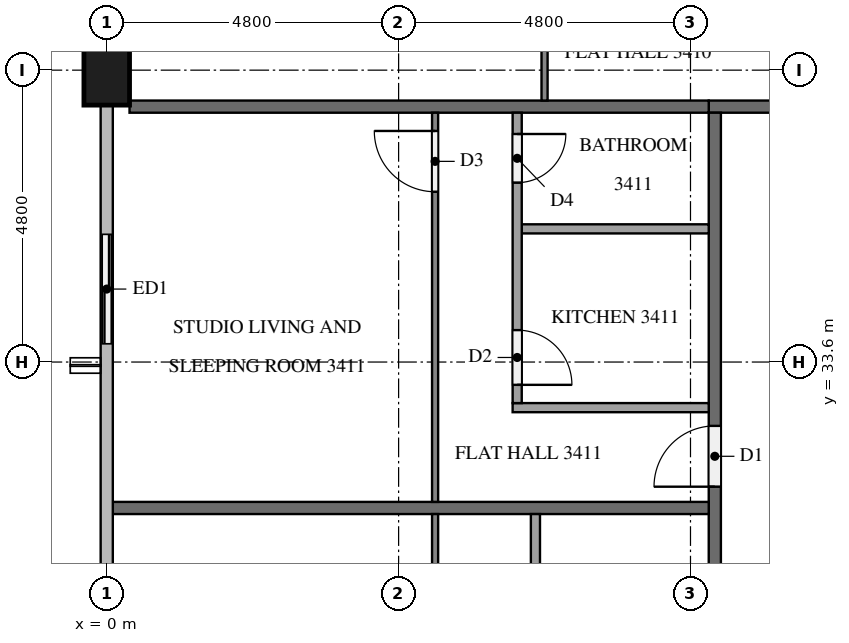
"""IFC4 building model, lengths in metres.
Left out: names, types, materials, properties, quantities, classifications, styles, units other than length and angle.
Written with IfcOpenShell. Run it as: python <this file> out.ifc"""

import sys

from ifc_helpers import new_model, si_unit, direction, frame, frame_2d, origin, origin_2d, place, context, subcontext, project, spatial, rectangle, extrude, element, fill, save


model = new_model("IFC4")
c1 = context("Model", 3, precision=1e-05, world=origin(), true_north=direction((0.0, 1.0)))
c2 = subcontext(c1, "Body", "Model", "MODEL_VIEW")
j1 = project(units=[si_unit("LENGTHUNIT", "METRE"), si_unit("PLANEANGLEUNIT", "RADIAN")], contexts=[c1])
p1 = place(None, origin())
s1 = spatial("IfcSite", under=j1, at=p1, CompositionType="ELEMENT")
p2 = place(p1, origin())
s2 = spatial("IfcBuilding", under=s1, at=p2, CompositionType="ELEMENT")
p3 = place(p2, frame((0.0, 0.0, 133.1)))
s3 = spatial("IfcBuildingStorey", under=s2, at=p3, CompositionType="ELEMENT", Elevation=133.1)
p4 = place(p3, frame((0.0, 38.4, 0.0), z_axis=(0.0, 0.0, 1.0), x_axis=(0.0, 1.0, 0.0)))
e1 = element("IfcColumn", 1, at=p4, inside=s3, PredefinedType="COLUMN", context=c2, shape_type="SweptSolid", body=[
    extrude(rectangle(XDim=1.15, YDim=0.75, at=origin_2d()), origin(), (0.0, 0.0, 1.0), 3.2),
])
p5 = place(p3, frame((0.0, 36.0, 0.0), z_axis=(0.0, 0.0, 1.0), x_axis=(0.0, -1.0, 0.0)))
e2 = element("IfcWall", 2, at=p5, inside=s3, PredefinedType="SOLIDWALL", context=c2, shape_type="SweptSolid", body=[
    extrude(rectangle(XDim=2.4, YDim=0.15, at=frame_2d((1.2, 0.0))), origin(), (0.0, 0.0, 1.0), 3.2),
])
p6 = place(p5, frame((0.3, 0.0, 0.0)))
e3 = element("IfcOpeningElement", 3, at=p6, cuts=e2, PredefinedType="OPENING", context=c2, shape_type="SweptSolid", body=[
    extrude(rectangle(XDim=1.8, YDim=2.4, at=frame_2d((0.9, 1.2))), frame((0.0, 0.085, 0.0), z_axis=(0.0, -1.0, 0.0), x_axis=(1.0, 0.0, 0.0)), (0.0, 0.0, 1.0), 0.17),
])
p7 = place(p3, frame((12.1, 37.8, 0.0), z_axis=(0.0, 0.0, 1.0), x_axis=(-1.0, 0.0, 0.0)))
e4 = element("IfcWall", 4, at=p7, inside=s3, PredefinedType="PARTITIONING", context=c2, shape_type="SweptSolid", body=[
    extrude(rectangle(XDim=2.2, YDim=0.2, at=frame_2d((1.1, 0.0))), origin(), (0.0, 0.0, 1.0), 3.2),
])
p8 = place(p3, frame((10.0, 15.1, 0.0), z_axis=(0.0, 0.0, 1.0), x_axis=(0.0, 1.0, 0.0)))
e5 = element("IfcWall", 5, at=p8, inside=s3, PredefinedType="PARTITIONING", context=c2, shape_type="SweptSolid", body=[
    extrude(rectangle(XDim=22.6, YDim=0.2, at=frame_2d((11.3, 0.0))), origin(), (0.0, 0.0, 1.0), 3.2),
])
p9 = place(p8, frame((16.45, 0.0, 0.0)))
e6 = element("IfcOpeningElement", 6, at=p9, cuts=e5, PredefinedType="OPENING", context=c2, shape_type="SweptSolid", body=[
    extrude(rectangle(XDim=1.0, YDim=2.1, at=frame_2d((0.5, 1.05))), frame((0.0, 0.11, 0.0), z_axis=(0.0, -1.0, 0.0), x_axis=(1.0, 0.0, 0.0)), (0.0, 0.0, 1.0), 0.22),
])
p10 = place(p8, frame((0.25, 0.0, 0.0)))
e7 = element("IfcOpeningElement", 7, at=p10, cuts=e5, PredefinedType="OPENING", context=c2, shape_type="SweptSolid", body=[
    extrude(rectangle(XDim=1.0, YDim=2.1, at=frame_2d((0.5, 1.05))), frame((0.0, 0.11, 0.0), z_axis=(0.0, -1.0, 0.0), x_axis=(1.0, 0.0, 0.0)), (0.0, 0.0, 1.0), 0.22),
])
p11 = place(p3, frame((0.375, 37.8, 0.0), z_axis=(0.0, 0.0, 1.0), x_axis=(1.0, 0.0, 0.0)))
e8 = element("IfcWall", 8, at=p11, inside=s3, PredefinedType="PARTITIONING", context=c2, shape_type="SweptSolid", body=[
    extrude(rectangle(XDim=9.525, YDim=0.2, at=frame_2d((4.762, 0.0))), origin(), (0.0, 0.0, 1.0), 3.2),
])
p12 = place(p3, frame((0.1, 31.2, 0.0), z_axis=(0.0, 0.0, 1.0), x_axis=(1.0, 0.0, 0.0)))
e9 = element("IfcWall", 9, at=p12, inside=s3, PredefinedType="PARTITIONING", context=c2, shape_type="SweptSolid", body=[
    extrude(rectangle(XDim=9.8, YDim=0.2, at=frame_2d((4.9, 0.0))), origin(), (0.0, 0.0, 1.0), 3.2),
])
p13 = place(p3, frame((7.2, 37.9, 0.0), z_axis=(0.0, 0.0, 1.0), x_axis=(0.0, 1.0, 0.0)))
e10 = element("IfcWall", 10, at=p13, inside=s3, PredefinedType="PARTITIONING", context=c2, shape_type="SweptSolid", body=[
    extrude(rectangle(XDim=14.8, YDim=0.1, at=frame_2d((7.4, 0.0))), origin(), (0.0, 0.0, 1.0), 3.2),
])
p14 = place(p13, frame((4.05, 0.0, 0.0)))
e11 = element("IfcOpeningElement", 11, at=p14, cuts=e10, PredefinedType="OPENING", context=c2, shape_type="SweptSolid", body=[
    extrude(rectangle(XDim=0.9, YDim=2.1, at=frame_2d((0.45, 1.05))), frame((0.0, 0.06, 0.0), z_axis=(0.0, -1.0, 0.0), x_axis=(1.0, 0.0, 0.0)), (0.0, 0.0, 1.0), 0.12),
])
p15 = place(p13, frame((5.65, 0.0, 0.0)))
e12 = element("IfcOpeningElement", 12, at=p15, cuts=e10, PredefinedType="OPENING", context=c2, shape_type="SweptSolid", body=[
    extrude(rectangle(XDim=0.9, YDim=2.1, at=frame_2d((0.45, 1.05))), frame((0.0, 0.06, 0.0), z_axis=(0.0, -1.0, 0.0), x_axis=(1.0, 0.0, 0.0)), (0.0, 0.0, 1.0), 0.12),
])
p16 = place(p13, frame((13.5, 0.0, 0.0)))
e13 = element("IfcOpeningElement", 13, at=p16, cuts=e10, PredefinedType="OPENING", context=c2, shape_type="SweptSolid", body=[
    extrude(rectangle(XDim=1.0, YDim=2.1, at=frame_2d((0.5, 1.05))), frame((0.0, 0.06, 0.0), z_axis=(0.0, -1.0, 0.0), x_axis=(1.0, 0.0, 0.0)), (0.0, 0.0, 1.0), 0.12),
])
p17 = place(p3, frame((5.4, 31.3, 0.0), z_axis=(0.0, 0.0, 1.0), x_axis=(0.0, 1.0, 0.0)))
e14 = element("IfcWall", 14, at=p17, inside=s3, PredefinedType="PARTITIONING", context=c2, shape_type="SweptSolid", body=[
    extrude(rectangle(XDim=6.4, YDim=0.1, at=frame_2d((3.2, 0.0))), origin(), (0.0, 0.0, 1.0), 3.2),
])
p18 = place(p17, frame((5.1, 0.0, 0.0)))
e15 = element("IfcOpeningElement", 15, at=p18, cuts=e14, PredefinedType="OPENING", context=c2, shape_type="SweptSolid", body=[
    extrude(rectangle(XDim=1.0, YDim=2.1, at=frame_2d((0.5, 1.05))), frame((0.0, 0.06, 0.0), z_axis=(0.0, -1.0, 0.0), x_axis=(1.0, 0.0, 0.0)), (0.0, 0.0, 1.0), 0.12),
])
p19 = place(p3, frame((9.9, 35.79, 0.0), z_axis=(0.0, 0.0, 1.0), x_axis=(-1.0, 0.0, 0.0)))
e16 = element("IfcWall", 16, at=p19, inside=s3, PredefinedType="PARTITIONING", context=c2, shape_type="SweptSolid", body=[
    extrude(rectangle(XDim=3.075, YDim=0.15, at=frame_2d((1.538, 0.0))), origin(), (0.0, 0.0, 1.0), 3.2),
])
p20 = place(p3, frame((9.9, 32.85, 0.0), z_axis=(0.0, 0.0, 1.0), x_axis=(-1.0, 0.0, 0.0)))
e17 = element("IfcWall", 17, at=p20, inside=s3, PredefinedType="PARTITIONING", context=c2, shape_type="SweptSolid", body=[
    extrude(rectangle(XDim=3.225, YDim=0.15, at=frame_2d((1.612, 0.0))), origin(), (0.0, 0.0, 1.0), 3.2),
])
p21 = place(p3, frame((6.75, 37.7, 0.0), z_axis=(0.0, 0.0, 1.0), x_axis=(0.0, -1.0, 0.0)))
e18 = element("IfcWall", 18, at=p21, inside=s3, PredefinedType="PARTITIONING", context=c2, shape_type="SweptSolid", body=[
    extrude(rectangle(XDim=4.775, YDim=0.15, at=frame_2d((2.387, 0.0))), origin(), (0.0, 0.0, 1.0), 3.2),
])
p22 = place(p21, frame((3.575, 0.0, 0.0)))
e19 = element("IfcOpeningElement", 19, at=p22, cuts=e18, PredefinedType="OPENING", context=c2, shape_type="SweptSolid", body=[
    extrude(rectangle(XDim=0.9, YDim=2.1, at=frame_2d((0.45, 1.05))), frame((0.0, 0.085, 0.0), z_axis=(0.0, -1.0, 0.0), x_axis=(1.0, 0.0, 0.0)), (0.0, 0.0, 1.0), 0.17),
])
p23 = place(p21, frame((0.35, 0.0, 0.0)))
e20 = element("IfcOpeningElement", 20, at=p23, cuts=e18, PredefinedType="OPENING", context=c2, shape_type="SweptSolid", body=[
    extrude(rectangle(XDim=0.8, YDim=2.1, at=frame_2d((0.4, 1.05))), frame((0.0, 0.085, 0.0), z_axis=(0.0, -1.0, 0.0), x_axis=(1.0, 0.0, 0.0)), (0.0, 0.0, 1.0), 0.17),
])
p24 = place(p3, frame((5.4, 15.1, 0.0), z_axis=(0.0, 0.0, 1.0), x_axis=(0.0, 1.0, 0.0)))
e21 = element("IfcWall", 21, at=p24, inside=s3, PredefinedType="PARTITIONING", context=c2, shape_type="SweptSolid", body=[
    extrude(rectangle(XDim=16.0, YDim=0.1, at=frame_2d((8.0, 0.0))), origin(), (0.0, 0.0, 1.0), 3.2),
])
p25 = place(p24, frame((0.3, 0.0, 0.0)))
e22 = element("IfcOpeningElement", 22, at=p25, cuts=e21, PredefinedType="OPENING", context=c2, shape_type="SweptSolid", body=[
    extrude(rectangle(XDim=1.0, YDim=2.1, at=frame_2d((0.5, 1.05))), frame((0.0, 0.06, 0.0), z_axis=(0.0, -1.0, 0.0), x_axis=(1.0, 0.0, 0.0)), (0.0, 0.0, 1.0), 0.12),
])
p26 = place(p24, frame((10.05, 0.0, 0.0)))
e23 = element("IfcOpeningElement", 23, at=p26, cuts=e21, PredefinedType="OPENING", context=c2, shape_type="SweptSolid", body=[
    extrude(rectangle(XDim=0.9, YDim=2.1, at=frame_2d((0.45, 1.05))), frame((0.0, 0.06, 0.0), z_axis=(0.0, -1.0, 0.0), x_axis=(1.0, 0.0, 0.0)), (0.0, 0.0, 1.0), 0.12),
])
p27 = place(p24, frame((11.65, 0.0, 0.0)))
e24 = element("IfcOpeningElement", 24, at=p27, cuts=e21, PredefinedType="OPENING", context=c2, shape_type="SweptSolid", body=[
    extrude(rectangle(XDim=0.9, YDim=2.1, at=frame_2d((0.45, 1.05))), frame((0.0, 0.06, 0.0), z_axis=(0.0, -1.0, 0.0), x_axis=(1.0, 0.0, 0.0)), (0.0, 0.0, 1.0), 0.12),
])
p28 = place(p3, frame((7.05, 31.1, 0.0), z_axis=(0.0, 0.0, 1.0), x_axis=(0.0, -1.0, 0.0)))
e25 = element("IfcWall", 25, at=p28, inside=s3, PredefinedType="PARTITIONING", context=c2, shape_type="SweptSolid", body=[
    extrude(rectangle(XDim=14.375, YDim=0.15, at=frame_2d((7.188, 0.0))), origin(), (0.0, 0.0, 1.0), 3.2),
])
p29 = place(p28, frame((13.175, 0.0, 0.0)))
e26 = element("IfcOpeningElement", 26, at=p29, cuts=e25, PredefinedType="OPENING", context=c2, shape_type="SweptSolid", body=[
    extrude(rectangle(XDim=0.9, YDim=2.1, at=frame_2d((0.45, 1.05))), frame((0.0, 0.085, 0.0), z_axis=(0.0, -1.0, 0.0), x_axis=(1.0, 0.0, 0.0)), (0.0, 0.0, 1.0), 0.17),
])
p30 = place(p28, frame((3.642, 0.0, 0.0)))
e27 = element("IfcOpeningElement", 27, at=p30, cuts=e25, PredefinedType="OPENING", context=c2, shape_type="SweptSolid", body=[
    extrude(rectangle(XDim=0.9, YDim=2.1, at=frame_2d((0.45, 1.05))), frame((0.0, 0.085, 0.0), z_axis=(0.0, -1.0, 0.0), x_axis=(1.0, 0.0, 0.0)), (0.0, 0.0, 1.0), 0.17),
])
p31 = place(p28, frame((2.192, 0.0, 0.0)))
e28 = element("IfcOpeningElement", 28, at=p31, cuts=e25, PredefinedType="OPENING", context=c2, shape_type="SweptSolid", body=[
    extrude(rectangle(XDim=0.8, YDim=2.1, at=frame_2d((0.4, 1.05))), frame((0.0, 0.085, 0.0), z_axis=(0.0, -1.0, 0.0), x_axis=(1.0, 0.0, 0.0)), (0.0, 0.0, 1.0), 0.17),
])
p32 = place(p6, origin())
e29 = element("IfcDoor", 29, at=p32, inside=s3, OperationType="SLIDING_TO_LEFT", PredefinedType="DOOR", context=c2, shape_type="SweptSolid", body=[
    extrude(rectangle(XDim=1.8, YDim=2.4, at=frame_2d((0.9, 1.2))), frame((0.0, 0.025, 0.0), z_axis=(0.0, -1.0, 0.0), x_axis=(1.0, 0.0, 0.0)), (0.0, 0.0, 1.0), 0.05),
])
fill(e3, e29)
p33 = place(p9, origin())
e30 = element("IfcDoor", 30, at=p33, inside=s3, OperationType="SINGLE_SWING_LEFT", PredefinedType="DOOR", context=c2, shape_type="SweptSolid", body=[
    extrude(rectangle(XDim=1.0, YDim=2.1, at=frame_2d((0.5, 1.05))), frame((0.0, 0.025, 0.0), z_axis=(0.0, -1.0, 0.0), x_axis=(1.0, 0.0, 0.0)), (0.0, 0.0, 1.0), 0.05),
])
fill(e6, e30)
p34 = place(p18, origin())
e31 = element("IfcDoor", 31, at=p34, inside=s3, OperationType="SINGLE_SWING_RIGHT", PredefinedType="DOOR", context=c2, shape_type="SweptSolid", body=[
    extrude(rectangle(XDim=1.0, YDim=2.1, at=frame_2d((0.5, 1.05))), frame((0.0, 0.025, 0.0), z_axis=(0.0, -1.0, 0.0), x_axis=(1.0, 0.0, 0.0)), (0.0, 0.0, 1.0), 0.05),
])
fill(e15, e31)
p35 = place(p22, origin())
e32 = element("IfcDoor", 32, at=p35, inside=s3, OperationType="SINGLE_SWING_RIGHT", PredefinedType="DOOR", context=c2, shape_type="SweptSolid", body=[
    extrude(rectangle(XDim=0.9, YDim=2.1, at=frame_2d((0.45, 1.05))), frame((0.0, 0.025, 0.0), z_axis=(0.0, -1.0, 0.0), x_axis=(1.0, 0.0, 0.0)), (0.0, 0.0, 1.0), 0.05),
])
fill(e19, e32)
p36 = place(p23, origin())
e33 = element("IfcDoor", 33, at=p36, inside=s3, OperationType="SINGLE_SWING_LEFT", PredefinedType="DOOR", context=c2, shape_type="SweptSolid", body=[
    extrude(rectangle(XDim=0.8, YDim=2.1, at=frame_2d((0.4, 1.05))), frame((0.0, 0.025, 0.0), z_axis=(0.0, -1.0, 0.0), x_axis=(1.0, 0.0, 0.0)), (0.0, 0.0, 1.0), 0.05),
])
fill(e20, e33)
save(model, sys.argv[1])
